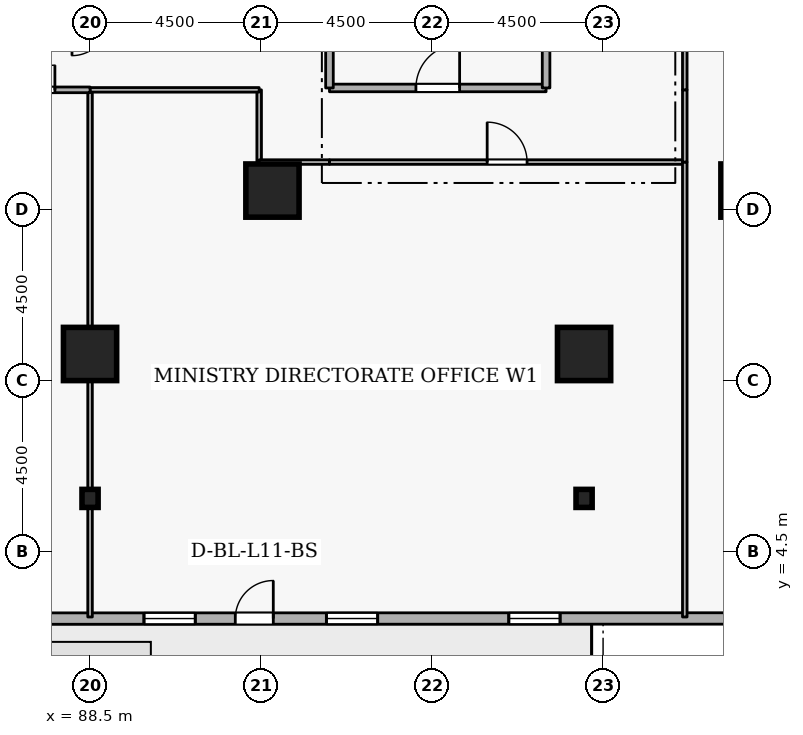
"""IFC4 building model, lengths in metres.
Left out: names, types, materials, properties, quantities, classifications, styles, units other than length and angle.
Written with IfcOpenShell. Run it as: python <this file> out.ifc"""

import sys

from ifc_helpers import new_model, si_unit, direction, frame, frame_2d, origin, origin_2d, place, context, subcontext, project, spatial, rectangle, i_section, extrude, element, fill, save


model = new_model("IFC4")
c1 = context("Model", 3, precision=1e-05, world=origin(), true_north=direction((0.0, 1.0)))
c2 = subcontext(c1, "Body", "Model", "MODEL_VIEW")
j1 = project(units=[si_unit("LENGTHUNIT", "METRE"), si_unit("PLANEANGLEUNIT", "RADIAN")], contexts=[c1])
p1 = place(None, origin())
s1 = spatial("IfcSite", under=j1, at=p1, CompositionType="ELEMENT")
p2 = place(p1, origin())
s2 = spatial("IfcBuilding", under=s1, at=p2, CompositionType="ELEMENT")
p3 = place(p2, frame((0.0, 0.0, 45.9)))
s3 = spatial("IfcBuildingStorey", under=s2, at=p3, CompositionType="ELEMENT", Elevation=45.9)
for number, where, z_axis, x_axis in (
    (1, (105.8, 14.0, 0.0), (0.0, 0.0, 1.0), (1.0, 0.0, 0.0)),
    (2, (101.5, 9.7, 0.0), (0.0, 0.0, 1.0), (1.0, 0.0, 0.0)),
    (3, (88.5, 9.7, 0.0), (0.0, 0.0, 1.0), (1.0, 0.0, 0.0)),
    (4, (93.3, 14.0, 0.0), (0.0, 0.0, 1.0), (1.0, 0.0, 0.0)),
):
    element("IfcColumn", number, at=place(p3, frame(where, z_axis=z_axis, x_axis=x_axis)), inside=s3, PredefinedType="COLUMN", context=c2, shape_type="SweptSolid", body=[
        extrude(rectangle(XDim=1.4, YDim=1.4, at=origin_2d()), origin(), (0.0, 0.0, 1.0), 3.6),
    ])
for number, where, z_axis, x_axis in (
    (5, (101.5, 5.9, 0.0), (0.0, 0.0, 1.0), (1.0, 0.0, 0.0)),
    (6, (88.5, 5.9, 0.0), (0.0, 0.0, 1.0), (1.0, 0.0, 0.0)),
):
    element("IfcColumn", number, at=place(p3, frame(where, z_axis=z_axis, x_axis=x_axis)), inside=s3, PredefinedType="COLUMN", context=c2, shape_type="SweptSolid", body=[
        extrude(i_section(OverallWidth=0.424, OverallDepth=0.475, WebThickness=0.048, FlangeThickness=0.077, FilletRadius=0.015, at=origin_2d()), origin(), (0.0, 0.0, 1.0), 3.6),
    ])
p4 = place(p3, frame((72.819, 2.735, 0.0), z_axis=(0.0, 0.0, 1.0), x_axis=(0.999999983929, 0.00017928314, 0.0)))
e7 = element("IfcWall", 7, at=p4, inside=s3, PredefinedType="STANDARD", context=c2, shape_type="SweptSolid", body=[
    extrude(rectangle(XDim=35.406, YDim=0.3, at=frame_2d((17.703, 0.0))), origin(), (0.0, 0.0, 1.0), 2.22),
])
p5 = place(p4, frame((19.503, 0.0, 0.0)))
e8 = element("IfcOpeningElement", 8, at=p5, cuts=e7, PredefinedType="OPENING", context=c2, shape_type="SweptSolid", body=[
    extrude(rectangle(XDim=1.0, YDim=2.08, at=frame_2d((0.5, 1.04))), frame((0.0, 0.16, 0.0), z_axis=(0.0, -1.0, 0.0), x_axis=(1.0, 0.0, 0.0)), (0.0, 0.0, 1.0), 0.32),
])
p6 = place(p4, frame((2.7, 0.0, 0.72)))
e9 = element("IfcOpeningElement", 9, at=p6, cuts=e7, PredefinedType="OPENING", context=c2, shape_type="SweptSolid", body=[
    extrude(rectangle(XDim=1.35, YDim=1.05, at=frame_2d((0.675, 0.525))), frame((0.0, 0.16, 0.0), z_axis=(0.0, -1.0, 0.0), x_axis=(1.0, 0.0, 0.0)), (0.0, 0.0, 1.0), 0.32),
])
p7 = place(p4, frame((7.5, 0.0, 0.72)))
e10 = element("IfcOpeningElement", 10, at=p7, cuts=e7, PredefinedType="OPENING", context=c2, shape_type="SweptSolid", body=[
    extrude(rectangle(XDim=1.35, YDim=1.05, at=frame_2d((0.675, 0.525))), frame((0.0, 0.16, 0.0), z_axis=(0.0, -1.0, 0.0), x_axis=(1.0, 0.0, 0.0)), (0.0, 0.0, 1.0), 0.32),
])
p8 = place(p4, frame((17.1, 0.0, 0.72)))
e11 = element("IfcOpeningElement", 11, at=p8, cuts=e7, PredefinedType="OPENING", context=c2, shape_type="SweptSolid", body=[
    extrude(rectangle(XDim=1.35, YDim=1.05, at=frame_2d((0.675, 0.525))), frame((0.0, 0.16, 0.0), z_axis=(0.0, -1.0, 0.0), x_axis=(1.0, 0.0, 0.0)), (0.0, 0.0, 1.0), 0.32),
])
p9 = place(p4, frame((21.9, 0.0, 0.72)))
e12 = element("IfcOpeningElement", 12, at=p9, cuts=e7, PredefinedType="OPENING", context=c2, shape_type="SweptSolid", body=[
    extrude(rectangle(XDim=1.35, YDim=1.05, at=frame_2d((0.675, 0.525))), frame((0.0, 0.16, 0.0), z_axis=(0.0, -1.0, 0.0), x_axis=(1.0, 0.0, 0.0)), (0.0, 0.0, 1.0), 0.32),
])
p10 = place(p4, frame((26.7, 0.0, 0.72)))
e13 = element("IfcOpeningElement", 13, at=p10, cuts=e7, PredefinedType="OPENING", context=c2, shape_type="SweptSolid", body=[
    extrude(rectangle(XDim=1.35, YDim=1.05, at=frame_2d((0.675, 0.525))), frame((0.0, 0.16, 0.0), z_axis=(0.0, -1.0, 0.0), x_axis=(1.0, 0.0, 0.0)), (0.0, 0.0, 1.0), 0.32),
])
p11 = place(p3, frame((94.8, 16.7, 0.0), z_axis=(0.0, 0.0, 1.0), x_axis=(1.0, 0.0, 0.0)))
e14 = element("IfcWall", 14, at=p11, inside=s3, PredefinedType="STANDARD", context=c2, shape_type="SweptSolid", body=[
    extrude(rectangle(XDim=5.7, YDim=0.2, at=frame_2d((2.85, 0.0))), origin(), (0.0, 0.0, 1.0), 3.26),
])
p12 = place(p11, frame((2.275, 0.0, 0.0)))
e15 = element("IfcOpeningElement", 15, at=p12, cuts=e14, PredefinedType="OPENING", context=c2, shape_type="SweptSolid", body=[
    extrude(rectangle(XDim=1.15, YDim=2.1, at=frame_2d((0.575, 1.05))), frame((0.0, 0.11, 0.0), z_axis=(0.0, -1.0, 0.0), x_axis=(1.0, 0.0, 0.0)), (0.0, 0.0, 1.0), 0.22),
])
for number, where, z_axis, x_axis in (
    (16, (100.5, 16.7, 0.0), (0.0, 0.0, 1.0), (0.0, 1.0, 0.0)),
    (17, (94.8, 19.2, 0.0), (0.0, 0.0, 1.0), (0.0, -1.0, 0.0)),
):
    element("IfcWall", number, at=place(p3, frame(where, z_axis=z_axis, x_axis=x_axis)), inside=s3, PredefinedType="STANDARD", context=c2, shape_type="SweptSolid", body=[
        extrude(rectangle(XDim=2.5, YDim=0.2, at=frame_2d((1.25, 0.0))), origin(), (0.0, 0.0, 1.0), 3.26),
    ])
p13 = place(p3, frame((92.95, 16.65, 0.0), z_axis=(0.0, 0.0, 1.0), x_axis=(0.0, -1.0, 0.0)))
e18 = element("IfcWall", 18, at=p13, inside=s3, PredefinedType="PARTITIONING", context=c2, shape_type="SweptSolid", body=[
    extrude(rectangle(XDim=1.9, YDim=0.12, at=frame_2d((0.95, 0.0))), origin(), (0.0, 0.0, 1.0), 3.26),
])
p14 = place(p3, frame((92.95, 14.75, 0.0), z_axis=(0.0, 0.0, 1.0), x_axis=(1.0, 0.0, 0.0)))
e19 = element("IfcWall", 19, at=p14, inside=s3, PredefinedType="PARTITIONING", context=c2, shape_type="SweptSolid", body=[
    extrude(rectangle(XDim=1.85, YDim=0.12, at=frame_2d((0.925, 0.0))), origin(), (0.0, 0.0, 1.0), 3.26),
])
p15 = place(p3, frame((94.8, 14.75, 0.0), z_axis=(0.0, 0.0, 1.0), x_axis=(1.0, 0.0, 0.0)))
e20 = element("IfcWall", 20, at=p15, inside=s3, PredefinedType="PARTITIONING", context=c2, shape_type="SweptSolid", body=[
    extrude(rectangle(XDim=9.35, YDim=0.12, at=frame_2d((4.675, 0.0))), origin(), (0.0, 0.0, 1.0), 3.26),
])
p16 = place(p15, frame((4.15, 0.0, 0.0)))
e21 = element("IfcOpeningElement", 21, at=p16, cuts=e20, PredefinedType="OPENING", context=c2, shape_type="SweptSolid", body=[
    extrude(rectangle(XDim=1.05, YDim=2.1, at=frame_2d((0.525, 1.05))), frame((0.0, 0.07, 0.0), z_axis=(0.0, -1.0, 0.0), x_axis=(1.0, 0.0, 0.0)), (0.0, 0.0, 1.0), 0.14),
])
p17 = place(p3, frame((104.15, 14.75, 0.0), z_axis=(0.0, 0.0, 1.0), x_axis=(0.0, -1.0, 0.0)))
e22 = element("IfcWall", 22, at=p17, inside=s3, PredefinedType="PARTITIONING", context=c2, shape_type="SweptSolid", body=[
    extrude(rectangle(XDim=11.97, YDim=0.12, at=frame_2d((5.985, 0.0))), origin(), (0.0, 0.0, 1.0), 3.26),
])
p18 = place(p3, frame((88.5, 2.78, 0.0), z_axis=(0.0, 0.0, 1.0), x_axis=(0.0, 1.0, 0.0)))
e23 = element("IfcWall", 23, at=p18, inside=s3, PredefinedType="PARTITIONING", context=c2, shape_type="SweptSolid", body=[
    extrude(rectangle(XDim=13.87, YDim=0.12, at=frame_2d((6.935, 0.0))), origin(), (0.0, 0.0, 1.0), 2.802),
])
p19 = place(p3, frame((88.5, 16.65, 0.0), z_axis=(0.0, 0.0, 1.0), x_axis=(1.0, 0.0, 0.0)))
e24 = element("IfcWall", 24, at=p19, inside=s3, PredefinedType="PARTITIONING", context=c2, shape_type="SweptSolid", body=[
    extrude(rectangle(XDim=4.45, YDim=0.12, at=frame_2d((2.225, 0.0))), origin(), (0.0, 0.0, 1.0), 3.26),
])
p20 = place(p3, frame((85.35, 16.65, 0.0), z_axis=(0.0, 0.0, 1.0), x_axis=(1.0, 0.0, 0.0)))
e25 = element("IfcWall", 25, at=p20, inside=s3, PredefinedType="PARTITIONING", context=c2, shape_type="SweptSolid", body=[
    extrude(rectangle(XDim=3.15, YDim=0.15, at=frame_2d((1.575, 0.0))), origin(), (0.0, 0.0, 1.0), 3.26),
])
p21 = place(p20, frame((0.925, 0.0, 0.0)))
e26 = element("IfcOpeningElement", 26, at=p21, cuts=e25, PredefinedType="OPENING", context=c2, shape_type="SweptSolid", body=[
    extrude(rectangle(XDim=1.3, YDim=2.12, at=frame_2d((0.65, 1.06))), frame((0.0, 0.085, 0.0), z_axis=(0.0, -1.0, 0.0), x_axis=(1.0, 0.0, 0.0)), (0.0, 0.0, 1.0), 0.17),
])
p22 = place(p3, frame((104.15, 14.75, 0.0), z_axis=(0.0, 0.0, 1.0), x_axis=(0.0, 1.0, 0.0)))
e27 = element("IfcWall", 27, at=p22, inside=s3, PredefinedType="PARTITIONING", context=c2, shape_type="SweptSolid", body=[
    extrude(rectangle(XDim=1.9, YDim=0.12, at=frame_2d((0.95, 0.0))), origin(), (0.0, 0.0, 1.0), 3.26),
])
p23 = place(p3, frame((104.15, 16.65, 0.0), z_axis=(0.0, 0.0, 1.0), x_axis=(0.0, 1.0, 0.0)))
e28 = element("IfcWall", 28, at=p23, inside=s3, PredefinedType="PARTITIONING", context=c2, shape_type="SweptSolid", body=[
    extrude(rectangle(XDim=4.85, YDim=0.12, at=frame_2d((2.425, 0.0))), origin(), (0.0, 0.0, 1.0), 3.26),
])
p24 = place(p23, frame((1.9, 0.0, 0.0)))
e29 = element("IfcOpeningElement", 29, at=p24, cuts=e28, PredefinedType="OPENING", context=c2, shape_type="SweptSolid", body=[
    extrude(rectangle(XDim=1.05, YDim=2.1, at=frame_2d((0.525, 1.05))), frame((0.0, 0.07, 0.0), z_axis=(0.0, -1.0, 0.0), x_axis=(1.0, 0.0, 0.0)), (0.0, 0.0, 1.0), 0.14),
])
p25 = place(p5, origin())
e30 = element("IfcDoor", 30, at=p25, inside=s3, OperationType="SINGLE_SWING_RIGHT", PredefinedType="DOOR", context=c2, shape_type="SweptSolid", body=[
    extrude(rectangle(XDim=1.0, YDim=2.08, at=frame_2d((0.5, 1.04))), frame((0.0, 0.025, 0.0), z_axis=(0.0, -1.0, 0.0), x_axis=(1.0, 0.0, 0.0)), (0.0, 0.0, 1.0), 0.05),
])
fill(e8, e30)
p26 = place(p8, origin())
e31 = element("IfcWindow", 31, at=p26, inside=s3, PartitioningType="SINGLE_PANEL", PredefinedType="WINDOW", context=c2, shape_type="SweptSolid", body=[
    extrude(rectangle(XDim=1.35, YDim=1.05, at=frame_2d((0.675, 0.525))), frame((0.0, 0.03, 0.0), z_axis=(0.0, -1.0, 0.0), x_axis=(1.0, 0.0, 0.0)), (0.0, 0.0, 1.0), 0.06),
])
fill(e11, e31)
p27 = place(p9, origin())
e32 = element("IfcWindow", 32, at=p27, inside=s3, PartitioningType="SINGLE_PANEL", PredefinedType="WINDOW", context=c2, shape_type="SweptSolid", body=[
    extrude(rectangle(XDim=1.35, YDim=1.05, at=frame_2d((0.675, 0.525))), frame((0.0, 0.03, 0.0), z_axis=(0.0, -1.0, 0.0), x_axis=(1.0, 0.0, 0.0)), (0.0, 0.0, 1.0), 0.06),
])
fill(e12, e32)
p28 = place(p10, origin())
e33 = element("IfcWindow", 33, at=p28, inside=s3, PartitioningType="SINGLE_PANEL", PredefinedType="WINDOW", context=c2, shape_type="SweptSolid", body=[
    extrude(rectangle(XDim=1.35, YDim=1.05, at=frame_2d((0.675, 0.525))), frame((0.0, 0.03, 0.0), z_axis=(0.0, -1.0, 0.0), x_axis=(1.0, 0.0, 0.0)), (0.0, 0.0, 1.0), 0.06),
])
fill(e13, e33)
p29 = place(p12, origin())
e34 = element("IfcDoor", 34, at=p29, inside=s3, OperationType="SINGLE_SWING_RIGHT", PredefinedType="DOOR", context=c2, shape_type="SweptSolid", body=[
    extrude(rectangle(XDim=1.15, YDim=2.1, at=frame_2d((0.575, 1.05))), frame((0.0, 0.025, 0.0), z_axis=(0.0, -1.0, 0.0), x_axis=(1.0, 0.0, 0.0)), (0.0, 0.0, 1.0), 0.05),
])
fill(e15, e34)
p30 = place(p16, origin())
e35 = element("IfcDoor", 35, at=p30, inside=s3, OperationType="SINGLE_SWING_LEFT", PredefinedType="DOOR", context=c2, shape_type="SweptSolid", body=[
    extrude(rectangle(XDim=1.05, YDim=2.1, at=frame_2d((0.525, 1.05))), frame((0.0, 0.025, 0.0), z_axis=(0.0, -1.0, 0.0), x_axis=(1.0, 0.0, 0.0)), (0.0, 0.0, 1.0), 0.05),
])
fill(e21, e35)
p31 = place(p21, origin())
e36 = element("IfcDoor", 36, at=p31, inside=s3, OperationType="DOUBLE_DOOR_SINGLE_SWING", PredefinedType="DOOR", context=c2, shape_type="SweptSolid", body=[
    extrude(rectangle(XDim=1.3, YDim=2.12, at=frame_2d((0.65, 1.06))), frame((0.0, 0.025, 0.0), z_axis=(0.0, -1.0, 0.0), x_axis=(1.0, 0.0, 0.0)), (0.0, 0.0, 1.0), 0.05),
])
fill(e26, e36)
save(model, sys.argv[1])
